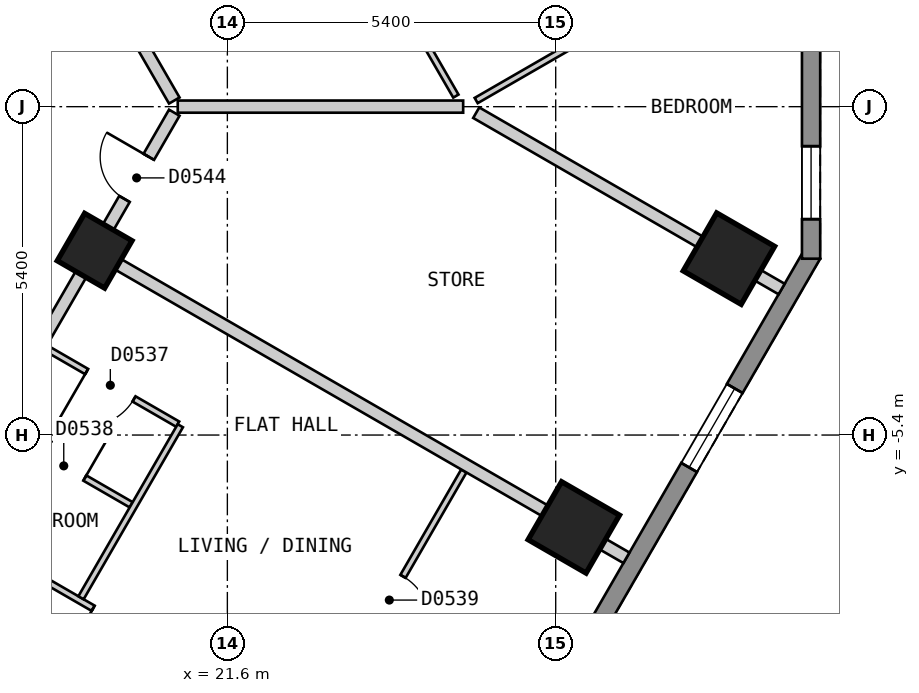
"""IFC4 building model, lengths in metres.
Left out: names, types, materials, properties, quantities, classifications, styles, units other than length and angle.
Written with IfcOpenShell. Run it as: python <this file> out.ifc"""

import sys

from ifc_helpers import new_model, si_unit, direction, frame, frame_2d, origin, origin_2d, place, context, subcontext, project, spatial, polyline, rectangle, outline, extrude, element, fill, save


model = new_model("IFC4")
c1 = context("Model", 3, precision=1e-05, world=origin(), true_north=direction((0.0, 1.0)))
c2 = subcontext(c1, "Body", "Model", "MODEL_VIEW")
j1 = project(units=[si_unit("LENGTHUNIT", "METRE"), si_unit("PLANEANGLEUNIT", "RADIAN")], contexts=[c1])
p1 = place(None, origin())
s1 = spatial("IfcSite", under=j1, at=p1, CompositionType="ELEMENT")
p2 = place(p1, origin())
s2 = spatial("IfcBuilding", under=s1, at=p2, CompositionType="ELEMENT")
p3 = place(p2, frame((0.0, 0.0, 56.4)))
s3 = spatial("IfcBuildingStorey", under=s2, at=p3, CompositionType="ELEMENT", Elevation=56.4)
for number, where, z_axis, x_axis in (
    (1, (27.298, -6.919, 0.0), (0.0, 0.0, 1.0), (0.5, 0.866, 0.0)),
    (2, (29.849, -2.499, 0.0), (0.0, 0.0, 1.0), (0.5, 0.866, 0.0)),
):
    element("IfcColumn", number, at=place(p3, frame(where, z_axis=z_axis, x_axis=x_axis)), inside=s3, PredefinedType="COLUMN", context=c2, shape_type="SweptSolid", body=[
        extrude(rectangle(XDim=1.1, YDim=1.1, at=origin_2d()), origin(), (0.0, 0.0, 1.0), 3.0),
    ])
p4 = place(p3, frame((19.417, -2.369, 0.0), z_axis=(0.0, 0.0, 1.0), x_axis=(0.499984884929, 0.866034130299, 0.0)))
e3 = element("IfcColumn", 3, at=p4, inside=s3, PredefinedType="COLUMN", context=c2, shape_type="SweptSolid", body=[
    extrude(rectangle(XDim=0.9, YDim=0.9, at=origin_2d()), origin(), (0.0, 0.0, 1.0), 3.0),
])
p5 = place(p3, frame((17.71, -25.825, 0.0), z_axis=(0.0, 0.0, 1.0), x_axis=(0.500001938803, 0.866024284413, 0.0)))
e4 = element("IfcWall", 4, at=p5, inside=s3, PredefinedType="SOLIDWALL", context=c2, shape_type="SweptSolid", body=[
    extrude(outline(polyline([(0.0, -0.15), (27.02, -0.15), (26.94, 0.15), (0.08, 0.15), (0.0, -0.15)])), origin(), (0.0, 0.0, 1.0), 2.7),
])
p6 = place(p5, frame((2.553, 0.0, 0.15)))
e5 = element("IfcOpeningElement", 5, at=p6, cuts=e4, PredefinedType="OPENING", context=c2, shape_type="SweptSolid", body=[
    extrude(rectangle(XDim=1.5, YDim=2.1, at=frame_2d((0.75, 1.05))), frame((0.0, 0.16, 0.0), z_axis=(0.0, -1.0, 0.0), x_axis=(1.0, 0.0, 0.0)), (0.0, 0.0, 1.0), 0.32),
])
p7 = place(p5, frame((7.658, 0.0, 0.15)))
e6 = element("IfcOpeningElement", 6, at=p7, cuts=e4, PredefinedType="OPENING", context=c2, shape_type="SweptSolid", body=[
    extrude(rectangle(XDim=1.5, YDim=2.1, at=frame_2d((0.75, 1.05))), frame((0.0, 0.16, 0.0), z_axis=(0.0, -1.0, 0.0), x_axis=(1.0, 0.0, 0.0)), (0.0, 0.0, 1.0), 0.32),
])
p8 = place(p5, frame((12.761, 0.0, 0.15)))
e7 = element("IfcOpeningElement", 7, at=p8, cuts=e4, PredefinedType="OPENING", context=c2, shape_type="SweptSolid", body=[
    extrude(rectangle(XDim=1.5, YDim=2.1, at=frame_2d((0.75, 1.05))), frame((0.0, 0.16, 0.0), z_axis=(0.0, -1.0, 0.0), x_axis=(1.0, 0.0, 0.0)), (0.0, 0.0, 1.0), 0.32),
])
p9 = place(p5, frame((17.865, 0.0, 0.15)))
e8 = element("IfcOpeningElement", 8, at=p9, cuts=e4, PredefinedType="OPENING", context=c2, shape_type="SweptSolid", body=[
    extrude(rectangle(XDim=1.5, YDim=2.1, at=frame_2d((0.75, 1.05))), frame((0.0, 0.16, 0.0), z_axis=(0.0, -1.0, 0.0), x_axis=(1.0, 0.0, 0.0)), (0.0, 0.0, 1.0), 0.32),
])
p10 = place(p5, frame((22.969, 0.0, 0.15)))
e9 = element("IfcOpeningElement", 9, at=p10, cuts=e4, PredefinedType="OPENING", context=c2, shape_type="SweptSolid", body=[
    extrude(rectangle(XDim=1.5, YDim=2.1, at=frame_2d((0.75, 1.05))), frame((0.0, 0.16, 0.0), z_axis=(0.0, -1.0, 0.0), x_axis=(1.0, 0.0, 0.0)), (0.0, 0.0, 1.0), 0.32),
])
p11 = place(p3, frame((31.2, -2.5, 0.0), z_axis=(0.0, 0.0, 1.0), x_axis=(0.0, 1.0, 0.0)))
e10 = element("IfcWall", 10, at=p11, inside=s3, PredefinedType="SOLIDWALL", context=c2, shape_type="SweptSolid", body=[
    extrude(outline(polyline([(0.0, -0.15), (5.0, -0.15), (4.92, 0.15), (0.08, 0.15), (0.0, -0.15)])), origin(), (0.0, 0.0, 1.0), 2.7),
])
p12 = place(p11, frame((0.65, 0.0, 0.15)))
e11 = element("IfcOpeningElement", 11, at=p12, cuts=e10, PredefinedType="OPENING", context=c2, shape_type="SweptSolid", body=[
    extrude(rectangle(XDim=1.2, YDim=2.1, at=frame_2d((0.6, 1.05))), frame((0.0, 0.16, 0.0), z_axis=(0.0, -1.0, 0.0), x_axis=(1.0, 0.0, 0.0)), (0.0, 0.0, 1.0), 0.32),
])
p13 = place(p3, frame((10.45, 17.9, 0.0), z_axis=(0.0, 0.0, 1.0), x_axis=(0.500034352617, -0.866005569383, 0.0)))
e12 = element("IfcWall", 12, at=p13, inside=s3, PredefinedType="PARTITIONING", context=c2, shape_type="SweptSolid", body=[
    extrude(rectangle(XDim=20.553, YDim=0.2, at=frame_2d((10.276, 0.0))), origin(), (0.0, 0.0, 1.0), 2.7),
])
p14 = place(p13, frame((14.902, 0.0, 0.0)))
e13 = element("IfcOpeningElement", 13, at=p14, cuts=e12, PredefinedType="OPENING", context=c2, shape_type="SweptSolid", body=[
    extrude(rectangle(XDim=1.0, YDim=2.1, at=frame_2d((0.5, 1.05))), frame((0.0, 0.11, 0.0), z_axis=(0.0, -1.0, 0.0), x_axis=(1.0, 0.0, 0.0)), (0.0, 0.0, 1.0), 0.22),
])
p15 = place(p13, frame((4.671, 0.0, 0.0)))
e14 = element("IfcOpeningElement", 14, at=p15, cuts=e12, PredefinedType="OPENING", context=c2, shape_type="SweptSolid", body=[
    extrude(rectangle(XDim=1.0, YDim=2.1, at=frame_2d((0.5, 1.05))), frame((0.0, 0.11, 0.0), z_axis=(0.0, -1.0, 0.0), x_axis=(1.0, 0.0, 0.0)), (0.0, 0.0, 1.0), 0.22),
])
p16 = place(p3, frame((15.707, -8.794, 0.0), z_axis=(0.0, 0.0, 1.0), x_axis=(0.50000451406, 0.866022797575, 0.0)))
e15 = element("IfcWall", 15, at=p16, inside=s3, PredefinedType="PARTITIONING", context=c2, shape_type="SweptSolid", body=[
    extrude(rectangle(XDim=10.04, YDim=0.2, at=frame_2d((5.02, 0.0))), origin(), (0.0, 0.0, 1.0), 2.7),
])
p17 = place(p16, frame((4.367, 0.0, 0.0)))
e16 = element("IfcOpeningElement", 16, at=p17, cuts=e15, PredefinedType="OPENING", context=c2, shape_type="SweptSolid", body=[
    extrude(rectangle(XDim=1.0, YDim=2.1, at=frame_2d((0.5, 1.05))), frame((0.0, 0.11, 0.0), z_axis=(0.0, -1.0, 0.0), x_axis=(1.0, 0.0, 0.0)), (0.0, 0.0, 1.0), 0.22),
])
p18 = place(p16, frame((8.402, 0.0, 0.0)))
e17 = element("IfcOpeningElement", 17, at=p18, cuts=e15, PredefinedType="OPENING", context=c2, shape_type="SweptSolid", body=[
    extrude(rectangle(XDim=0.8, YDim=2.1, at=frame_2d((0.4, 1.05))), frame((0.0, 0.11, 0.0), z_axis=(0.0, -1.0, 0.0), x_axis=(1.0, 0.0, 0.0)), (0.0, 0.0, 1.0), 0.22),
])
p19 = place(p3, frame((17.844, -5.292, 0.0), z_axis=(0.0, 0.0, 1.0), x_axis=(0.866038211682, -0.499977815414, 0.0)))
e18 = element("IfcWall", 18, at=p19, inside=s3, PredefinedType="PARTITIONING", context=c2, shape_type="SweptSolid", body=[
    extrude(rectangle(XDim=2.51, YDim=0.1, at=frame_2d((1.255, 0.0))), origin(), (0.0, 0.0, 1.0), 2.7),
])
p20 = place(p19, frame((0.83, 0.0, 0.0)))
e19 = element("IfcOpeningElement", 19, at=p20, cuts=e18, PredefinedType="OPENING", context=c2, shape_type="SweptSolid", body=[
    extrude(rectangle(XDim=0.8, YDim=2.1, at=frame_2d((0.4, 1.05))), frame((0.0, 0.06, 0.0), z_axis=(0.0, -1.0, 0.0), x_axis=(1.0, 0.0, 0.0)), (0.0, 0.0, 1.0), 0.12),
])
p21 = place(p3, frame((18.61, -3.966, 0.0), z_axis=(0.0, 0.0, 1.0), x_axis=(0.865958718457, -0.500115484592, 0.0)))
e20 = element("IfcWall", 20, at=p21, inside=s3, PredefinedType="PARTITIONING", context=c2, shape_type="SweptSolid", body=[
    extrude(rectangle(XDim=2.509, YDim=0.1, at=frame_2d((1.255, 0.0))), origin(), (0.0, 0.0, 1.0), 2.7),
])
p22 = place(p21, frame((0.78, 0.0, 0.0)))
e21 = element("IfcOpeningElement", 21, at=p22, cuts=e20, PredefinedType="OPENING", context=c2, shape_type="SweptSolid", body=[
    extrude(rectangle(XDim=0.9, YDim=2.1, at=frame_2d((0.45, 1.05))), frame((0.0, 0.06, 0.0), z_axis=(0.0, -1.0, 0.0), x_axis=(1.0, 0.0, 0.0)), (0.0, 0.0, 1.0), 0.12),
])
p23 = place(p3, frame((16.951, -6.839, 0.0), z_axis=(0.0, 0.0, 1.0), x_axis=(0.866022959057, -0.500004234368, 0.0)))
e22 = element("IfcWall", 22, at=p23, inside=s3, PredefinedType="PARTITIONING", context=c2, shape_type="SweptSolid", body=[
    extrude(rectangle(XDim=10.0, YDim=0.1, at=frame_2d((5.0, 0.0))), origin(), (0.0, 0.0, 1.0), 2.7),
])
p24 = place(p23, frame((4.995, 0.0, 0.0)))
e23 = element("IfcOpeningElement", 23, at=p24, cuts=e22, PredefinedType="OPENING", context=c2, shape_type="SweptSolid", body=[
    extrude(rectangle(XDim=0.9, YDim=2.1, at=frame_2d((0.45, 1.05))), frame((0.0, 0.06, 0.0), z_axis=(0.0, -1.0, 0.0), x_axis=(1.0, 0.0, 0.0)), (0.0, 0.0, 1.0), 0.12),
])
p25 = place(p23, frame((2.82, 0.0, 0.0)))
e24 = element("IfcOpeningElement", 24, at=p25, cuts=e22, PredefinedType="OPENING", context=c2, shape_type="SweptSolid", body=[
    extrude(rectangle(XDim=0.8, YDim=2.1, at=frame_2d((0.4, 1.05))), frame((0.0, 0.06, 0.0), z_axis=(0.0, -1.0, 0.0), x_axis=(1.0, 0.0, 0.0)), (0.0, 0.0, 1.0), 0.12),
])
p26 = place(p3, frame((19.193, -8.076, 0.0), z_axis=(0.0, 0.0, 1.0), x_axis=(0.499901468276, 0.866082283629, 0.0)))
e25 = element("IfcWall", 25, at=p26, inside=s3, PredefinedType="PARTITIONING", context=c2, shape_type="SweptSolid", body=[
    extrude(rectangle(XDim=3.266, YDim=0.1, at=frame_2d((1.633, 0.0))), origin(), (0.0, 0.0, 1.0), 2.7),
])
p27 = place(p3, frame((23.013, -10.281, 0.0), z_axis=(0.0, 0.0, 1.0), x_axis=(0.499881743012, 0.866093668724, 0.0)))
e26 = element("IfcWall", 26, at=p27, inside=s3, PredefinedType="PARTITIONING", context=c2, shape_type="SweptSolid", body=[
    extrude(rectangle(XDim=4.953, YDim=0.1, at=frame_2d((2.477, 0.0))), origin(), (0.0, 0.0, 1.0), 2.7),
])
p28 = place(p27, frame((2.052, 0.0, 0.0)))
e27 = element("IfcOpeningElement", 27, at=p28, cuts=e26, PredefinedType="OPENING", context=c2, shape_type="SweptSolid", body=[
    extrude(rectangle(XDim=0.9, YDim=2.1, at=frame_2d((0.45, 1.05))), frame((0.0, 0.06, 0.0), z_axis=(0.0, -1.0, 0.0), x_axis=(1.0, 0.0, 0.0)), (0.0, 0.0, 1.0), 0.12),
])
p29 = place(p3, frame((25.692, 0.101, 0.0), z_axis=(0.0, 0.0, 1.0), x_axis=(0.866116197112, 0.49984270836, 0.0)))
e28 = element("IfcWall", 28, at=p29, inside=s3, PredefinedType="PARTITIONING", context=c2, shape_type="SweptSolid", body=[
    extrude(rectangle(XDim=5.8, YDim=0.1, at=frame_2d((2.9, 0.0))), origin(), (0.0, 0.0, 1.0), 2.7),
])
p30 = place(p29, frame((2.35, 0.0, 0.0)))
e29 = element("IfcOpeningElement", 29, at=p30, cuts=e28, PredefinedType="OPENING", context=c2, shape_type="SweptSolid", body=[
    extrude(rectangle(XDim=0.9, YDim=2.1, at=frame_2d((0.45, 1.05))), frame((0.0, 0.06, 0.0), z_axis=(0.0, -1.0, 0.0), x_axis=(1.0, 0.0, 0.0)), (0.0, 0.0, 1.0), 0.12),
])
p31 = place(p3, frame((19.503, -2.419, 0.0), z_axis=(0.0, 0.0, 1.0), x_axis=(0.866022959057, -0.500004234368, 0.0)))
e30 = element("IfcWall", 30, at=p31, inside=s3, PredefinedType="PARTITIONING", context=c2, shape_type="SweptSolid", body=[
    extrude(rectangle(XDim=10.0, YDim=0.2, at=frame_2d((5.0, 0.0))), origin(), (0.0, 0.0, 1.0), 2.7),
])
p32 = place(p3, frame((25.693, -0.099, 0.0), z_axis=(0.0, 0.0, 1.0), x_axis=(0.866032775405, -0.499987231761, 0.0)))
e31 = element("IfcWall", 31, at=p32, inside=s3, PredefinedType="PARTITIONING", context=c2, shape_type="SweptSolid", body=[
    extrude(rectangle(XDim=5.8, YDim=0.2, at=frame_2d((2.9, 0.0))), origin(), (0.0, 0.0, 1.0), 2.7),
])
p33 = place(p3, frame((20.784, 0.001, 0.0), z_axis=(0.0, 0.0, 1.0), x_axis=(1.0, 0.0, 0.0)))
e32 = element("IfcWall", 32, at=p33, inside=s3, PredefinedType="PARTITIONING", context=c2, shape_type="SweptSolid", body=[
    extrude(rectangle(XDim=4.694, YDim=0.2, at=frame_2d((2.347, 0.0))), origin(), (0.0, 0.0, 1.0), 2.7),
])
p34 = place(p3, frame((22.921, 4.394, 0.0), z_axis=(0.0, 0.0, 1.0), x_axis=(0.500093956194, -0.865971151354, 0.0)))
e33 = element("IfcWall", 33, at=p34, inside=s3, PredefinedType="PARTITIONING", context=c2, shape_type="SweptSolid", body=[
    extrude(rectangle(XDim=4.873, YDim=0.1, at=frame_2d((2.437, 0.0))), origin(), (0.0, 0.0, 1.0), 2.7),
])
p35 = place(p34, frame((2.137, 0.0, 0.0)))
e34 = element("IfcOpeningElement", 34, at=p35, cuts=e33, PredefinedType="OPENING", context=c2, shape_type="SweptSolid", body=[
    extrude(rectangle(XDim=0.8, YDim=2.1, at=frame_2d((0.4, 1.05))), frame((0.0, 0.06, 0.0), z_axis=(0.0, -1.0, 0.0), x_axis=(1.0, 0.0, 0.0)), (0.0, 0.0, 1.0), 0.12),
])
p36 = place(p10, origin())
e35 = element("IfcWindow", 35, at=p36, inside=s3, PartitioningType="SINGLE_PANEL", PredefinedType="WINDOW", context=c2, shape_type="SweptSolid", body=[
    extrude(rectangle(XDim=1.5, YDim=2.1, at=frame_2d((0.75, 1.05))), frame((0.0, 0.03, 0.0), z_axis=(0.0, -1.0, 0.0), x_axis=(1.0, 0.0, 0.0)), (0.0, 0.0, 1.0), 0.06),
])
fill(e9, e35)
p37 = place(p12, origin())
e36 = element("IfcWindow", 36, at=p37, inside=s3, PartitioningType="SINGLE_PANEL", PredefinedType="WINDOW", context=c2, shape_type="SweptSolid", body=[
    extrude(rectangle(XDim=1.2, YDim=2.1, at=frame_2d((0.6, 1.05))), frame((0.0, 0.03, 0.0), z_axis=(0.0, -1.0, 0.0), x_axis=(1.0, 0.0, 0.0)), (0.0, 0.0, 1.0), 0.06),
])
fill(e11, e36)
p38 = place(p22, origin())
e37 = element("IfcDoor", 37, at=p38, inside=s3, OperationType="SINGLE_SWING_LEFT", PredefinedType="DOOR", context=c2, shape_type="SweptSolid", body=[
    extrude(rectangle(XDim=0.9, YDim=2.1, at=frame_2d((0.45, 1.05))), frame((0.0, 0.025, 0.0), z_axis=(0.0, -1.0, 0.0), x_axis=(1.0, 0.0, 0.0)), (0.0, 0.0, 1.0), 0.05),
])
fill(e21, e37)
p39 = place(p20, origin())
e38 = element("IfcDoor", 38, at=p39, inside=s3, OperationType="SINGLE_SWING_RIGHT", PredefinedType="DOOR", context=c2, shape_type="SweptSolid", body=[
    extrude(rectangle(XDim=0.8, YDim=2.1, at=frame_2d((0.4, 1.05))), frame((0.0, 0.025, 0.0), z_axis=(0.0, -1.0, 0.0), x_axis=(1.0, 0.0, 0.0)), (0.0, 0.0, 1.0), 0.05),
])
fill(e19, e38)
p40 = place(p28, origin())
e39 = element("IfcDoor", 39, at=p40, inside=s3, OperationType="SINGLE_SWING_LEFT", PredefinedType="DOOR", context=c2, shape_type="SweptSolid", body=[
    extrude(rectangle(XDim=0.9, YDim=2.1, at=frame_2d((0.45, 1.05))), frame((0.0, 0.025, 0.0), z_axis=(0.0, -1.0, 0.0), x_axis=(1.0, 0.0, 0.0)), (0.0, 0.0, 1.0), 0.05),
])
fill(e27, e39)
p41 = place(p25, origin())
e40 = element("IfcDoor", 40, at=p41, inside=s3, OperationType="SINGLE_SWING_LEFT", PredefinedType="DOOR", context=c2, shape_type="SweptSolid", body=[
    extrude(rectangle(XDim=0.8, YDim=2.1, at=frame_2d((0.4, 1.05))), frame((0.0, 0.025, 0.0), z_axis=(0.0, -1.0, 0.0), x_axis=(1.0, 0.0, 0.0)), (0.0, 0.0, 1.0), 0.05),
])
fill(e24, e40)
p42 = place(p18, origin())
e41 = element("IfcDoor", 41, at=p42, inside=s3, OperationType="SINGLE_SWING_RIGHT", PredefinedType="DOOR", context=c2, shape_type="SweptSolid", body=[
    extrude(rectangle(XDim=0.8, YDim=2.1, at=frame_2d((0.4, 1.05))), frame((0.0, 0.025, 0.0), z_axis=(0.0, -1.0, 0.0), x_axis=(1.0, 0.0, 0.0)), (0.0, 0.0, 1.0), 0.05),
])
fill(e17, e41)
save(model, sys.argv[1])
